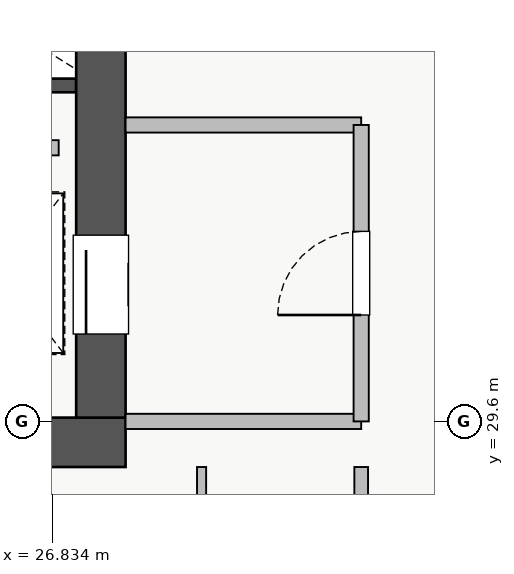
"""IFC4 building model, lengths in metres.
Left out: names, types, materials, properties, quantities, classifications, styles, units other than length and angle.
Written with IfcOpenShell. Run it as: python <this file> out.ifc"""

import sys

from ifc_helpers import new_model, si_unit, direction, frame, frame_2d, origin, place, context, subcontext, project, spatial, rectangle, extrude, source, transform, mapped, element, fill, save


model = new_model("IFC4")
c1 = context("Model", 3, precision=1e-05, world=origin(), true_north=direction((0.0, 1.0)))
c2 = subcontext(c1, "Body", "Model", "MODEL_VIEW")
j1 = project(units=[si_unit("LENGTHUNIT", "METRE"), si_unit("PLANEANGLEUNIT", "RADIAN")], contexts=[c1])
p1 = place(None, origin())
s1 = spatial("IfcSite", under=j1, at=p1, CompositionType="ELEMENT")
p2 = place(p1, origin())
s2 = spatial("IfcBuilding", under=s1, at=p2, CompositionType="ELEMENT")
p3 = place(p2, frame((0.0, 0.0, 119.75)))
s3 = spatial("IfcBuildingStorey", under=s2, at=p3, CompositionType="ELEMENT", Elevation=119.75)
p4 = place(p3, frame((25.8, 34.02, 0.0), z_axis=(0.0, 0.0, 1.0), x_axis=(1.0, 0.0, 0.0)))
e1 = element("IfcWall", 1, at=p4, inside=s3, PredefinedType="SHEAR", context=c2, shape_type="SweptSolid", body=[
    extrude(rectangle(XDim=1.35, YDim=0.18, at=frame_2d((0.675, 0.0))), origin(), (0.0, 0.0, 1.0), 3.07),
])
p5 = place(p3, frame((10.2, 29.325, 0.0), z_axis=(0.0, 0.0, 1.0), x_axis=(1.0, 0.0, 0.0)))
e2 = element("IfcWall", 2, at=p5, inside=s3, PredefinedType="SHEAR", context=c2, shape_type="SweptSolid", body=[
    extrude(rectangle(XDim=17.6, YDim=0.65, at=frame_2d((8.8, 0.0))), origin(), (0.0, 0.0, 1.0), 3.25),
])
p6 = place(p3, frame((27.475, 29.65, 0.0), z_axis=(0.0, 0.0, 1.0), x_axis=(0.0, 1.0, 0.0)))
e3 = element("IfcWall", 3, at=p6, inside=s3, PredefinedType="SHEAR", context=c2, shape_type="SweptSolid", body=[
    extrude(rectangle(XDim=5.9, YDim=0.65, at=frame_2d((2.95, 0.0))), origin(), (0.0, 0.0, 1.0), 3.25),
])
p7 = place(p6, frame((1.1, 0.0, 0.0)))
e4 = element("IfcOpeningElement", 4, at=p7, cuts=e3, PredefinedType="OPENING", context=c2, shape_type="SweptSolid", body=[
    extrude(rectangle(XDim=1.3, YDim=2.05, at=frame_2d((0.65, 1.025))), frame((0.0, 0.335, 0.0), z_axis=(0.0, -1.0, 0.0), x_axis=(1.0, 0.0, 0.0)), (0.0, 0.0, 1.0), 0.67),
])
for number, where, z_axis, x_axis in (
    (5, (27.8, 29.6, 0.0), (0.0, 0.0, 1.0), (1.0, 0.0, 0.0)),
    (6, (27.8, 33.5, 0.0), (0.0, 0.0, 1.0), (1.0, 0.0, 0.0)),
):
    element("IfcWall", number, at=place(p3, frame(where, z_axis=z_axis, x_axis=x_axis)), inside=s3, PredefinedType="PARTITIONING", context=c2, shape_type="SweptSolid", body=[
        extrude(rectangle(XDim=3.1, YDim=0.2, at=frame_2d((1.55, 0.0))), origin(), (0.0, 0.0, 1.0), 3.07),
    ])
p8 = place(p3, frame((30.9, 29.6, 0.0), z_axis=(0.0, 0.0, 1.0), x_axis=(0.0, 1.0, 0.0)))
e7 = element("IfcWall", 7, at=p8, inside=s3, PredefinedType="PARTITIONING", context=c2, shape_type="SweptSolid", body=[
    extrude(rectangle(XDim=3.9, YDim=0.2, at=frame_2d((1.95, 0.0))), origin(), (0.0, 0.0, 1.0), 3.07),
])
p9 = place(p8, frame((1.4, 0.0, 0.0)))
e8 = element("IfcOpeningElement", 8, at=p9, cuts=e7, PredefinedType="OPENING", context=c2, shape_type="SweptSolid", body=[
    extrude(rectangle(XDim=1.1, YDim=2.05, at=frame_2d((0.55, 1.025))), frame((0.0, 0.11, 0.0), z_axis=(0.0, -1.0, 0.0), x_axis=(1.0, 0.0, 0.0)), (0.0, 0.0, 1.0), 0.22),
])
p10 = place(p3, frame((21.75, 33.2, 0.0), z_axis=(0.0, 0.0, 1.0), x_axis=(1.0, 0.0, 0.0)))
e9 = element("IfcWall", 9, at=p10, inside=s3, PredefinedType="PARTITIONING", context=c2, shape_type="SweptSolid", body=[
    extrude(rectangle(XDim=5.17, YDim=0.2, at=frame_2d((2.585, 0.0))), origin(), (0.0, 0.0, 1.0), 3.07),
])
p11 = place(p3, frame((28.8, 26.11, 0.0), z_axis=(0.0, 0.0, 1.0), x_axis=(0.0, 1.0, 0.0)))
e10 = element("IfcWall", 10, at=p11, inside=s3, PredefinedType="PLUMBINGWALL", context=c2, shape_type="SweptSolid", body=[
    extrude(rectangle(XDim=2.89, YDim=0.12, at=frame_2d((1.445, 0.0))), origin(), (0.0, 0.0, 1.0), 3.07),
])
p12 = place(p3, frame((30.9, 17.0, 0.0), z_axis=(0.0, 0.0, 1.0), x_axis=(0.0, 1.0, 0.0)))
e11 = element("IfcWall", 11, at=p12, inside=s3, PredefinedType="PARTITIONING", context=c2, shape_type="SweptSolid", body=[
    extrude(rectangle(XDim=12.0, YDim=0.18, at=frame_2d((6.0, 0.0))), origin(), (0.0, 0.0, 1.0), 3.07),
])
p13 = place(p12, frame((0.855, 0.0, 0.0)))
e12 = element("IfcOpeningElement", 12, at=p13, cuts=e11, PredefinedType="OPENING", context=c2, shape_type="SweptSolid", body=[
    extrude(rectangle(XDim=1.0, YDim=2.05, at=frame_2d((0.5, 1.025))), frame((0.0, 0.1, 0.0), z_axis=(0.0, -1.0, 0.0), x_axis=(1.0, 0.0, 0.0)), (0.0, 0.0, 1.0), 0.2),
])
p14 = place(p12, frame((6.725, 0.0, 0.0)))
e13 = element("IfcOpeningElement", 13, at=p14, cuts=e11, PredefinedType="OPENING", context=c2, shape_type="SweptSolid", body=[
    extrude(rectangle(XDim=1.0, YDim=2.05, at=frame_2d((0.5, 1.025))), frame((0.0, 0.1, 0.0), z_axis=(0.0, -1.0, 0.0), x_axis=(1.0, 0.0, 0.0)), (0.0, 0.0, 1.0), 0.2),
])
m1 = source(origin(), c2, "Body", "SweptSolid", [
    extrude(rectangle(XDim=1.3, YDim=2.05, at=frame_2d((0.65, 1.025))), frame((0.0, 0.025, 0.0), z_axis=(0.0, -1.0, 0.0), x_axis=(1.0, 0.0, 0.0)), (0.0, 0.0, 1.0), 0.05),
])
p15 = place(p7, origin())
e14 = element("IfcDoor", 14, at=p15, inside=s3, OperationType="SLIDING_TO_LEFT", PredefinedType="DOOR", context=c2, shape_type="MappedRepresentation", body=[
    mapped(m1, transform((0.0, 0.0, 0.0), x_axis=(1.0, 0.0, 0.0), y_axis=(0.0, 1.0, 0.0), z_axis=(0.0, 0.0, 1.0), scale=1.0)),
])
fill(e4, e14)
m2 = source(origin(), c2, "Body", "SweptSolid", [
    extrude(rectangle(XDim=1.1, YDim=2.05, at=frame_2d((0.55, 1.025))), frame((0.0, 0.025, 0.0), z_axis=(0.0, -1.0, 0.0), x_axis=(1.0, 0.0, 0.0)), (0.0, 0.0, 1.0), 0.05),
])
p16 = place(p9, origin())
e15 = element("IfcDoor", 15, at=p16, inside=s3, OperationType="SINGLE_SWING_LEFT", PredefinedType="DOOR", context=c2, shape_type="MappedRepresentation", body=[
    mapped(m2, transform((0.0, 0.0, 0.0), x_axis=(1.0, 0.0, 0.0), y_axis=(0.0, 1.0, 0.0), z_axis=(0.0, 0.0, 1.0), scale=1.0)),
])
fill(e8, e15)
save(model, sys.argv[1])
